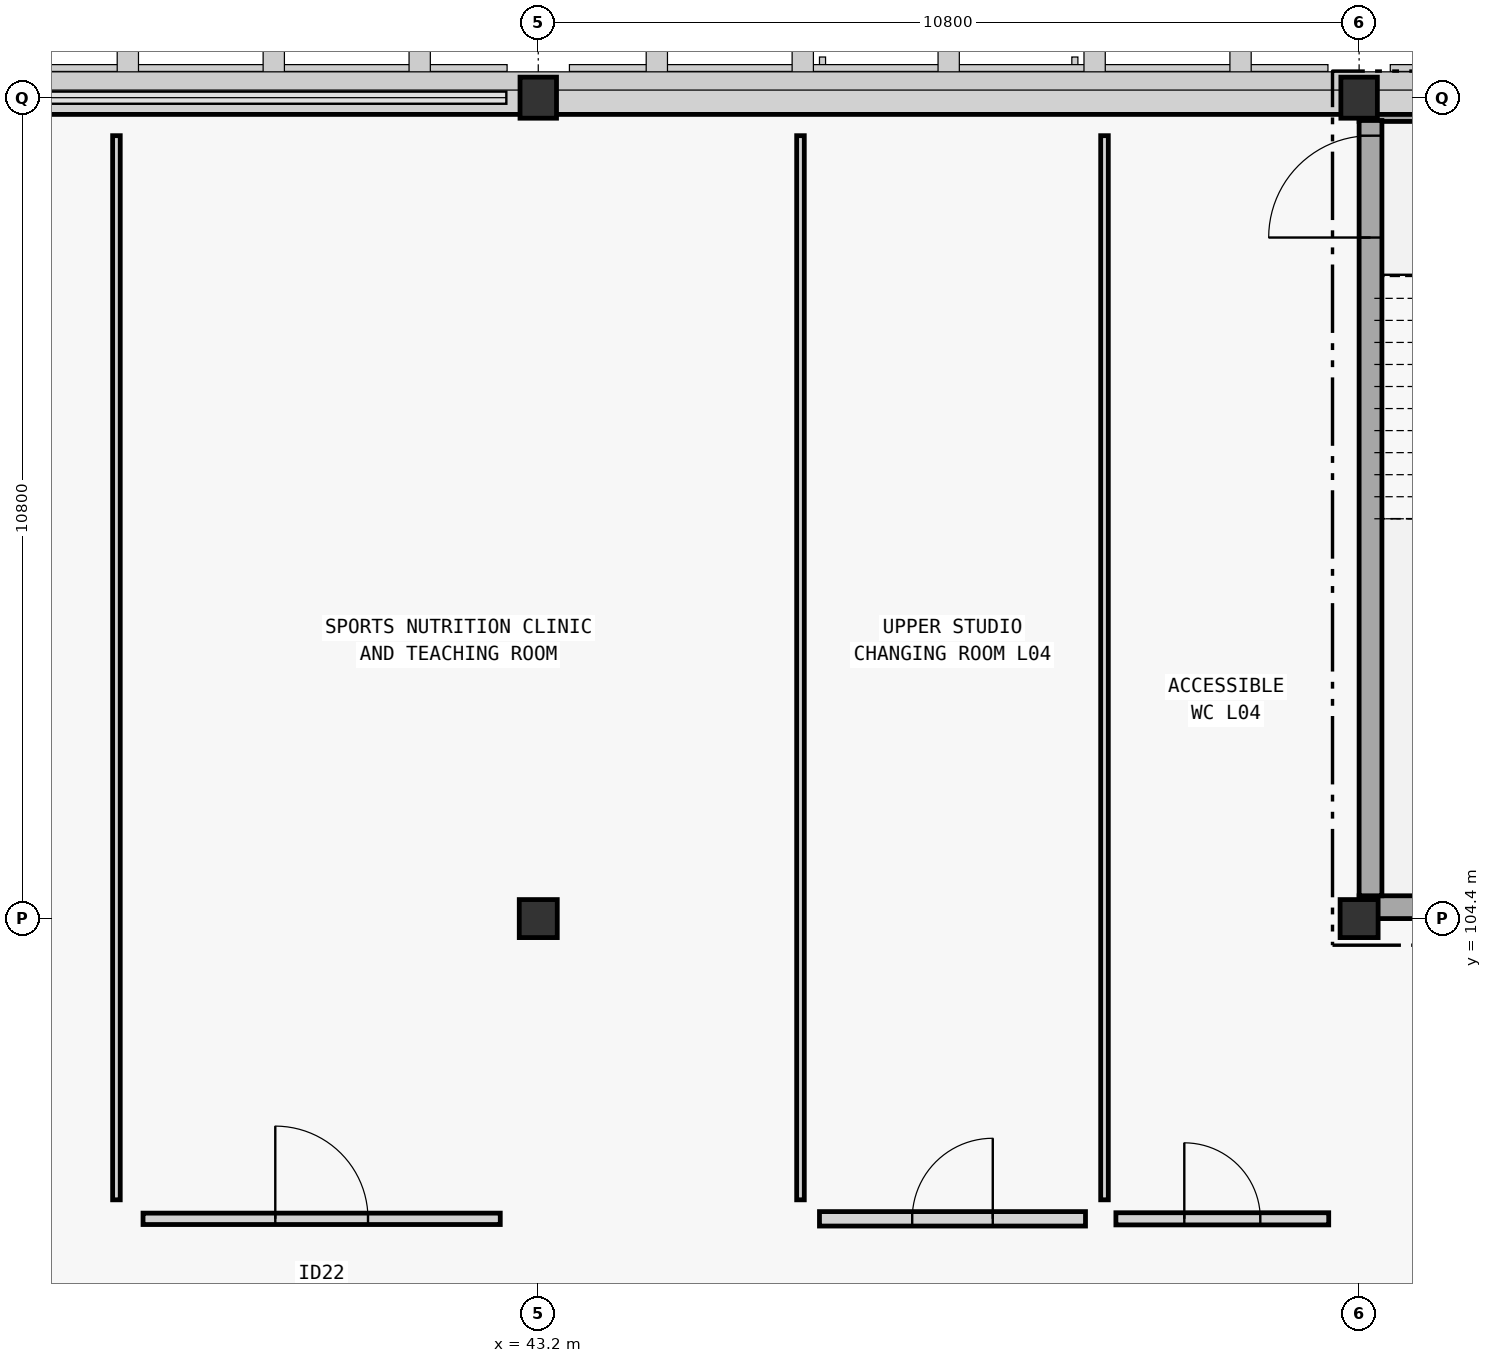
"""IFC4 building model, lengths in metres.
Left out: names, types, materials, properties, quantities, classifications, styles, units other than length and angle.
Written with IfcOpenShell. Run it as: python <this file> out.ifc"""

import sys

from ifc_helpers import new_model, si_unit, direction, frame, frame_2d, origin, origin_2d, place, context, subcontext, project, spatial, rectangle, extrude, element, fill, save


model = new_model("IFC4")
c1 = context("Model", 3, precision=1e-05, world=origin(), true_north=direction((0.0, 1.0)))
c2 = subcontext(c1, "Body", "Model", "MODEL_VIEW")
j1 = project(units=[si_unit("LENGTHUNIT", "METRE"), si_unit("PLANEANGLEUNIT", "RADIAN")], contexts=[c1])
p1 = place(None, origin())
s1 = spatial("IfcSite", under=j1, at=p1, CompositionType="ELEMENT")
p2 = place(p1, origin())
s2 = spatial("IfcBuilding", under=s1, at=p2, CompositionType="ELEMENT")
p3 = place(p2, frame((0.0, 0.0, 19.2)))
s3 = spatial("IfcBuildingStorey", under=s2, at=p3, CompositionType="ELEMENT", Elevation=19.2)
p4 = place(p3, frame((43.2, 104.4, 0.0), z_axis=(0.0, 0.0, 1.0), x_axis=(1.0, 0.0, 0.0)))
e1 = element("IfcColumn", 1, at=p4, inside=s3, PredefinedType="COLUMN", context=c2, shape_type="SweptSolid", body=[
    extrude(rectangle(XDim=0.5, YDim=0.5, at=origin_2d()), origin(), (0.0, 0.0, 1.0), 4.2),
])
p5 = place(p3, frame((43.2, 115.2, 0.0), z_axis=(0.0, 0.0, 1.0), x_axis=(1.0, 0.0, 0.0)))
e2 = element("IfcColumn", 2, at=p5, inside=s3, PredefinedType="COLUMN", context=c2, shape_type="SweptSolid", body=[
    extrude(rectangle(XDim=0.48, YDim=0.54, at=origin_2d()), origin(), (0.0, 0.0, 1.0), 4.2),
])
p6 = place(p3, frame((54.0, 104.4, 0.0), z_axis=(0.0, 0.0, 1.0), x_axis=(1.0, 0.0, 0.0)))
e3 = element("IfcColumn", 3, at=p6, inside=s3, PredefinedType="COLUMN", context=c2, shape_type="SweptSolid", body=[
    extrude(rectangle(XDim=0.5, YDim=0.5, at=origin_2d()), origin(), (0.0, 0.0, 1.0), 4.2),
])
p7 = place(p3, frame((54.0, 115.2, 0.0), z_axis=(0.0, 0.0, 1.0), x_axis=(1.0, 0.0, 0.0)))
e4 = element("IfcColumn", 4, at=p7, inside=s3, PredefinedType="COLUMN", context=c2, shape_type="SweptSolid", body=[
    extrude(rectangle(XDim=0.48, YDim=0.54, at=origin_2d()), origin(), (0.0, 0.0, 1.0), 4.2),
])
p8 = place(p3, frame((64.8, 104.55, 0.0), z_axis=(0.0, 0.0, 1.0), x_axis=(-1.0, 0.0, 0.0)))
e5 = element("IfcWall", 5, at=p8, inside=s3, PredefinedType="SHEAR", context=c2, shape_type="SweptSolid", body=[
    extrude(rectangle(XDim=10.8, YDim=0.3, at=frame_2d((5.4, 0.0))), origin(), (0.0, 0.0, 1.0), 4.2),
])
p9 = place(p3, frame((54.0, 115.05, 0.0), z_axis=(0.0, 0.0, 1.0), x_axis=(1.0, 0.0, 0.0)))
e6 = element("IfcWall", 6, at=p9, inside=s3, PredefinedType="SHEAR", context=c2, shape_type="SweptSolid", body=[
    extrude(rectangle(XDim=10.8, YDim=0.325, at=frame_2d((5.4, 0.0))), origin(), (0.0, 0.0, 1.0), 4.2),
])
p10 = place(p3, frame((54.15, 104.7, 0.0), z_axis=(0.0, 0.0, 1.0), x_axis=(0.0, 1.0, 0.0)))
e7 = element("IfcWall", 7, at=p10, inside=s3, PredefinedType="SHEAR", context=c2, shape_type="SweptSolid", body=[
    extrude(rectangle(XDim=10.2, YDim=0.3, at=frame_2d((5.1, 0.0))), origin(), (0.0, 0.0, 1.0), 4.2),
])
p11 = place(p10, frame((8.66, 0.0, 0.0)))
e8 = element("IfcOpeningElement", 8, at=p11, cuts=e7, PredefinedType="OPENING", context=c2, shape_type="SweptSolid", body=[
    extrude(rectangle(XDim=1.34, YDim=2.18, at=frame_2d((0.67, 1.09))), frame((0.0, 0.15, 0.0), z_axis=(0.0, -1.0, 0.0), x_axis=(1.0, 0.0, 0.0)), (0.0, 0.0, 1.0), 0.3),
])
p12 = place(p3, frame((43.436, 115.2, 0.0), z_axis=(0.0, 0.0, 1.0), x_axis=(1.0, 0.0, 0.0)))
e9 = element("IfcWall", 9, at=p12, inside=s3, PredefinedType="STANDARD", context=c2, shape_type="SweptSolid", body=[
    extrude(rectangle(XDim=10.328, YDim=0.38, at=frame_2d((5.164, 0.0))), origin(), (0.0, 0.0, 1.0), 3.155),
])
p13 = place(p3, frame((0.1, 115.2, 4.2), z_axis=(0.0, 0.0, 1.0), x_axis=(1.0, 0.0, 0.0)))
e10 = element("IfcWall", 10, at=p13, inside=s3, PredefinedType="PARAPET", context=c2, shape_type="SweptSolid", body=[
    extrude(rectangle(XDim=64.6, YDim=0.44, at=frame_2d((32.3, 0.0))), origin(), (0.0, 0.0, 1.0), 0.95),
])
p14 = place(p3, frame((38.0, 100.45, 0.0), z_axis=(0.0, 0.0, 1.0), x_axis=(1.0, 0.0, 0.0)))
e11 = element("IfcWall", 11, at=p14, inside=s3, PredefinedType="STANDARD", context=c2, shape_type="SweptSolid", body=[
    extrude(rectangle(XDim=4.7, YDim=0.15, at=frame_2d((2.35, 0.0))), origin(), (0.0, 0.0, 1.0), 3.0),
])
p15 = place(p14, frame((1.74, 0.0, 0.0)))
e12 = element("IfcOpeningElement", 12, at=p15, cuts=e11, PredefinedType="OPENING", context=c2, shape_type="SweptSolid", body=[
    extrude(rectangle(XDim=1.22, YDim=2.16, at=frame_2d((0.61, 1.08))), frame((0.0, 0.075, 0.0), z_axis=(0.0, -1.0, 0.0), x_axis=(1.0, 0.0, 0.0)), (0.0, 0.0, 1.0), 0.15),
])
p16 = place(p3, frame((46.9, 100.45, 0.0), z_axis=(0.0, 0.0, 1.0), x_axis=(1.0, 0.0, 0.0)))
e13 = element("IfcWall", 13, at=p16, inside=s3, PredefinedType="PLUMBINGWALL", context=c2, shape_type="SweptSolid", body=[
    extrude(rectangle(XDim=3.5, YDim=0.19, at=frame_2d((1.75, 0.0))), origin(), (0.0, 0.0, 1.0), 3.0),
])
p17 = place(p16, frame((1.22, 0.0, 0.0)))
e14 = element("IfcOpeningElement", 14, at=p17, cuts=e13, PredefinedType="OPENING", context=c2, shape_type="SweptSolid", body=[
    extrude(rectangle(XDim=1.06, YDim=2.14, at=frame_2d((0.53, 1.07))), frame((0.0, 0.095, 0.0), z_axis=(0.0, -1.0, 0.0), x_axis=(1.0, 0.0, 0.0)), (0.0, 0.0, 1.0), 0.19),
])
p18 = place(p3, frame((50.8, 100.45, 0.0), z_axis=(0.0, 0.0, 1.0), x_axis=(1.0, 0.0, 0.0)))
e15 = element("IfcWall", 15, at=p18, inside=s3, PredefinedType="PLUMBINGWALL", context=c2, shape_type="SweptSolid", body=[
    extrude(rectangle(XDim=2.8, YDim=0.16, at=frame_2d((1.4, 0.0))), origin(), (0.0, 0.0, 1.0), 3.0),
])
p19 = place(p18, frame((0.9, 0.0, 0.0)))
e16 = element("IfcOpeningElement", 16, at=p19, cuts=e15, PredefinedType="OPENING", context=c2, shape_type="SweptSolid", body=[
    extrude(rectangle(XDim=1.0, YDim=2.15, at=frame_2d((0.5, 1.075))), frame((0.0, 0.08, 0.0), z_axis=(0.0, -1.0, 0.0), x_axis=(1.0, 0.0, 0.0)), (0.0, 0.0, 1.0), 0.16),
])
for number, where, z_axis, x_axis in (
    (17, (37.65, 100.7, 0.0), (0.0, 0.0, 1.0), (0.0, 1.0, 0.0)),
    (18, (46.65, 100.7, 0.0), (0.0, 0.0, 1.0), (0.0, 1.0, 0.0)),
    (19, (50.65, 100.7, 0.0), (0.0, 0.0, 1.0), (0.0, 1.0, 0.0)),
):
    element("IfcWall", number, at=place(p3, frame(where, z_axis=z_axis, x_axis=x_axis)), inside=s3, PredefinedType="STANDARD", context=c2, shape_type="SweptSolid", body=[
        extrude(rectangle(XDim=14.0, YDim=0.1, at=frame_2d((7.0, 0.0))), origin(), (0.0, 0.0, 1.0), 3.0),
    ])
p20 = place(p11, origin())
e20 = element("IfcDoor", 20, at=p20, inside=s3, OperationType="SINGLE_SWING_LEFT", PredefinedType="DOOR", context=c2, shape_type="SweptSolid", body=[
    extrude(rectangle(XDim=1.34, YDim=2.18, at=frame_2d((0.67, 1.09))), frame((0.0, 0.025, 0.0), z_axis=(0.0, -1.0, 0.0), x_axis=(1.0, 0.0, 0.0)), (0.0, 0.0, 1.0), 0.05),
])
fill(e8, e20)
p21 = place(p15, origin())
e21 = element("IfcDoor", 21, at=p21, inside=s3, OperationType="SINGLE_SWING_LEFT", PredefinedType="DOOR", context=c2, shape_type="SweptSolid", body=[
    extrude(rectangle(XDim=1.22, YDim=2.16, at=frame_2d((0.61, 1.08))), frame((0.0, 0.025, 0.0), z_axis=(0.0, -1.0, 0.0), x_axis=(1.0, 0.0, 0.0)), (0.0, 0.0, 1.0), 0.05),
])
fill(e12, e21)
p22 = place(p17, origin())
e22 = element("IfcDoor", 22, at=p22, inside=s3, OperationType="SINGLE_SWING_RIGHT", PredefinedType="DOOR", context=c2, shape_type="SweptSolid", body=[
    extrude(rectangle(XDim=1.06, YDim=2.14, at=frame_2d((0.53, 1.07))), frame((0.0, 0.025, 0.0), z_axis=(0.0, -1.0, 0.0), x_axis=(1.0, 0.0, 0.0)), (0.0, 0.0, 1.0), 0.05),
])
fill(e14, e22)
p23 = place(p19, origin())
e23 = element("IfcDoor", 23, at=p23, inside=s3, OperationType="SINGLE_SWING_LEFT", PredefinedType="DOOR", context=c2, shape_type="SweptSolid", body=[
    extrude(rectangle(XDim=1.0, YDim=2.15, at=frame_2d((0.5, 1.075))), frame((0.0, 0.025, 0.0), z_axis=(0.0, -1.0, 0.0), x_axis=(1.0, 0.0, 0.0)), (0.0, 0.0, 1.0), 0.05),
])
fill(e16, e23)
save(model, sys.argv[1])
